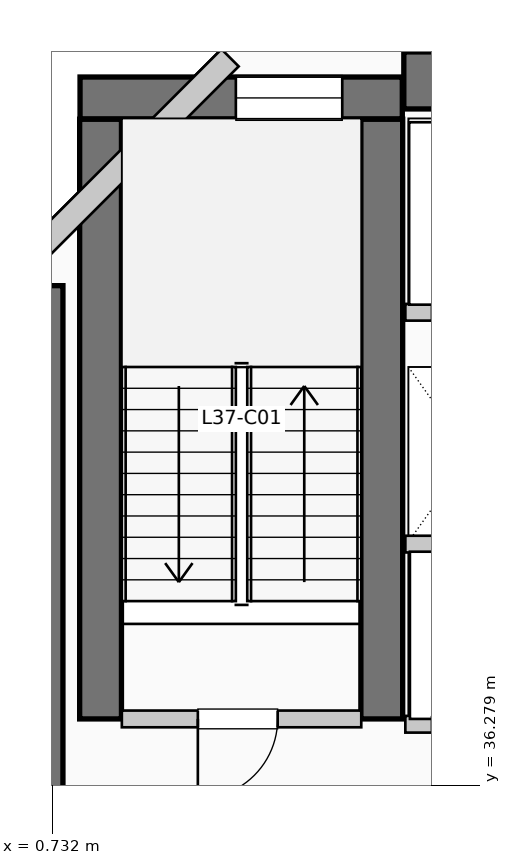
"""IFC4 building model, lengths in metres.
Left out: names, types, materials, properties, quantities, classifications, styles, units other than length and angle.
Written with IfcOpenShell. Run it as: python <this file> out.ifc"""

import sys

from ifc_helpers import new_model, si_unit, direction, frame, frame_2d, origin, place, context, subcontext, project, spatial, rectangle, extrude, element, fill, save


model = new_model("IFC4")
c1 = context("Model", 3, precision=1e-05, world=origin(), true_north=direction((0.0, 1.0)))
c2 = subcontext(c1, "Body", "Model", "MODEL_VIEW")
j1 = project(units=[si_unit("LENGTHUNIT", "METRE"), si_unit("PLANEANGLEUNIT", "RADIAN")], contexts=[c1])
p1 = place(None, origin())
s1 = spatial("IfcSite", under=j1, at=p1, CompositionType="ELEMENT")
p2 = place(p1, origin())
s2 = spatial("IfcBuilding", under=s1, at=p2, CompositionType="ELEMENT")
p3 = place(p2, frame((0.0, 0.0, 154.77)))
s3 = spatial("IfcBuildingStorey", under=s2, at=p3, CompositionType="ELEMENT", Elevation=154.77)
p4 = place(p3, frame((5.36, 45.55, 0.0), z_axis=(0.0, 0.0, 1.0), x_axis=(1.0, 0.0, 0.0)))
e1 = element("IfcWall", 1, at=p4, inside=s3, PredefinedType="SHEAR", context=c2, shape_type="SweptSolid", body=[
    extrude(rectangle(XDim=13.98, YDim=0.75, at=frame_2d((6.99, 0.0))), origin(), (0.0, 0.0, 1.0), 3.96),
])
p5 = place(p3, frame((0.5, 34.95, 0.0), z_axis=(0.0, 0.0, 1.0), x_axis=(0.0, 1.0, 0.0)))
e2 = element("IfcWall", 2, at=p5, inside=s3, PredefinedType="SHEAR", context=c2, shape_type="SweptSolid", body=[
    extrude(rectangle(XDim=7.9, YDim=0.75, at=frame_2d((3.95, 0.0))), origin(), (0.0, 0.0, 1.0), 3.96),
])
for number, where, z_axis, x_axis in (
    (3, (1.37, 37.15, 0.0), (0.0, 0.0, 1.0), (0.0, 1.0, 0.0)),
    (4, (5.07, 37.15, 0.0), (0.0, 0.0, 1.0), (0.0, 1.0, 0.0)),
):
    element("IfcWall", number, at=place(p3, frame(where, z_axis=z_axis, x_axis=x_axis)), inside=s3, PredefinedType="SHEAR", context=c2, shape_type="SweptSolid", body=[
        extrude(rectangle(XDim=7.89, YDim=0.55, at=frame_2d((3.945, 0.0))), origin(), (0.0, 0.0, 1.0), 3.96),
    ])
p6 = place(p3, frame((1.1, 45.32, 0.0), z_axis=(0.0, 0.0, 1.0), x_axis=(1.0, 0.0, 0.0)))
e5 = element("IfcWall", 5, at=p6, inside=s3, PredefinedType="SHEAR", context=c2, shape_type="SweptSolid", body=[
    extrude(rectangle(XDim=4.24, YDim=0.55, at=frame_2d((2.12, 0.0))), origin(), (0.0, 0.0, 1.0), 3.96),
])
p7 = place(p6, frame((2.05, 0.0, 1.05)))
e6 = element("IfcOpeningElement", 6, at=p7, cuts=e5, PredefinedType="OPENING", context=c2, shape_type="SweptSolid", body=[
    extrude(rectangle(XDim=1.4, YDim=1.8, at=frame_2d((0.7, 0.9))), frame((0.0, 0.285, 0.0), z_axis=(0.0, -1.0, 0.0), x_axis=(1.0, 0.0, 0.0)), (0.0, 0.0, 1.0), 0.57),
])
p8 = place(p3, frame((3.074, 45.848, 0.0), z_axis=(0.0, 0.0, 1.0), x_axis=(-0.707106781187, -0.707106781187, 0.0)))
e7 = element("IfcWall", 7, at=p8, inside=s3, PredefinedType="SOLIDWALL", context=c2, shape_type="SweptSolid", body=[
    extrude(rectangle(XDim=4.133, YDim=0.32, at=frame_2d((2.066, 0.0))), origin(), (0.0, 0.0, 1.0), 3.71),
])
p9 = place(p3, frame((1.65, 37.15, 0.0), z_axis=(0.0, 0.0, 1.0), x_axis=(1.0, 0.0, 0.0)))
e8 = element("IfcWall", 8, at=p9, inside=s3, PredefinedType="PARTITIONING", context=c2, shape_type="SweptSolid", body=[
    extrude(rectangle(XDim=3.15, YDim=0.22, at=frame_2d((1.575, 0.0))), origin(), (0.0, 0.0, 1.0), 3.71),
])
p10 = place(p9, frame((2.05, 0.0, 0.0), z_axis=(0.0, 0.0, 1.0), x_axis=(-1.0, 0.0, 0.0)))
e9 = element("IfcOpeningElement", 9, at=p10, cuts=e8, PredefinedType="OPENING", context=c2, shape_type="SweptSolid", body=[
    extrude(rectangle(XDim=1.05, YDim=2.15, at=frame_2d((0.525, 1.075))), frame((0.0, 0.12, 0.0), z_axis=(0.0, -1.0, 0.0), x_axis=(1.0, 0.0, 0.0)), (0.0, 0.0, 1.0), 0.24),
])
p11 = place(p3, frame((5.38, 37.08, 0.0), z_axis=(0.0, 0.0, 1.0), x_axis=(1.0, 0.0, 0.0)))
e10 = element("IfcWall", 10, at=p11, inside=s3, PredefinedType="PARTITIONING", context=c2, shape_type="SweptSolid", body=[
    extrude(rectangle(XDim=3.46, YDim=0.22, at=frame_2d((1.73, 0.0))), origin(), (0.0, 0.0, 1.0), 3.71),
])
p12 = place(p11, frame((1.55, 0.0, 0.0), z_axis=(0.0, 0.0, 1.0), x_axis=(-1.0, 0.0, 0.0)))
e11 = element("IfcOpeningElement", 11, at=p12, cuts=e10, PredefinedType="OPENING", context=c2, shape_type="SweptSolid", body=[
    extrude(rectangle(XDim=1.2, YDim=2.2, at=frame_2d((0.6, 1.1))), frame((0.0, 0.12, 0.0), z_axis=(0.0, -1.0, 0.0), x_axis=(1.0, 0.0, 0.0)), (0.0, 0.0, 1.0), 0.24),
])
p13 = place(p11, frame((3.22, 0.0, 0.0), z_axis=(0.0, 0.0, 1.0), x_axis=(-1.0, 0.0, 0.0)))
e12 = element("IfcOpeningElement", 12, at=p13, cuts=e10, PredefinedType="OPENING", context=c2, shape_type="SweptSolid", body=[
    extrude(rectangle(XDim=1.2, YDim=2.2, at=frame_2d((0.6, 1.1))), frame((0.0, 0.12, 0.0), z_axis=(0.0, -1.0, 0.0), x_axis=(1.0, 0.0, 0.0)), (0.0, 0.0, 1.0), 0.24),
])
p14 = place(p3, frame((5.38, 39.45, 0.0), z_axis=(0.0, 0.0, 1.0), x_axis=(1.0, 0.0, 0.0)))
e13 = element("IfcWall", 13, at=p14, inside=s3, PredefinedType="PARTITIONING", context=c2, shape_type="SweptSolid", body=[
    extrude(rectangle(XDim=3.46, YDim=0.22, at=frame_2d((1.73, 0.0))), origin(), (0.0, 0.0, 1.0), 3.71),
])
p15 = place(p3, frame((5.38, 42.5, 0.0), z_axis=(0.0, 0.0, 1.0), x_axis=(1.0, 0.0, 0.0)))
e14 = element("IfcWall", 14, at=p15, inside=s3, PredefinedType="PARTITIONING", context=c2, shape_type="SweptSolid", body=[
    extrude(rectangle(XDim=3.77, YDim=0.22, at=frame_2d((1.885, 0.0))), origin(), (0.0, 0.0, 1.0), 3.71),
])
p16 = place(p15, frame((1.75, 0.0, 0.0), z_axis=(0.0, 0.0, 1.0), x_axis=(-1.0, 0.0, 0.0)))
e15 = element("IfcOpeningElement", 15, at=p16, cuts=e14, PredefinedType="OPENING", context=c2, shape_type="SweptSolid", body=[
    extrude(rectangle(XDim=1.4, YDim=2.2, at=frame_2d((0.7, 1.1))), frame((0.0, 0.12, 0.0), z_axis=(0.0, -1.0, 0.0), x_axis=(1.0, 0.0, 0.0)), (0.0, 0.0, 1.0), 0.24),
])
p17 = place(p15, frame((3.53, 0.0, 0.0), z_axis=(0.0, 0.0, 1.0), x_axis=(-1.0, 0.0, 0.0)))
e16 = element("IfcOpeningElement", 16, at=p17, cuts=e14, PredefinedType="OPENING", context=c2, shape_type="SweptSolid", body=[
    extrude(rectangle(XDim=1.4, YDim=2.2, at=frame_2d((0.7, 1.1))), frame((0.0, 0.12, 0.0), z_axis=(0.0, -1.0, 0.0), x_axis=(1.0, 0.0, 0.0)), (0.0, 0.0, 1.0), 0.24),
])
p18 = place(p7, origin())
e17 = element("IfcWindow", 17, at=p18, inside=s3, PartitioningType="SINGLE_PANEL", PredefinedType="WINDOW", context=c2, shape_type="SweptSolid", body=[
    extrude(rectangle(XDim=1.4, YDim=1.8, at=frame_2d((0.7, 0.9))), frame((0.0, 0.03, 0.0), z_axis=(0.0, -1.0, 0.0), x_axis=(1.0, 0.0, 0.0)), (0.0, 0.0, 1.0), 0.06),
])
fill(e6, e17)
p19 = place(p10, origin())
e18 = element("IfcDoor", 18, at=p19, inside=s3, OperationType="SINGLE_SWING_LEFT", PredefinedType="DOOR", context=c2, shape_type="SweptSolid", body=[
    extrude(rectangle(XDim=1.05, YDim=2.15, at=frame_2d((0.525, 1.075))), frame((0.0, 0.025, 0.0), z_axis=(0.0, -1.0, 0.0), x_axis=(1.0, 0.0, 0.0)), (0.0, 0.0, 1.0), 0.05),
])
fill(e9, e18)
save(model, sys.argv[1])
